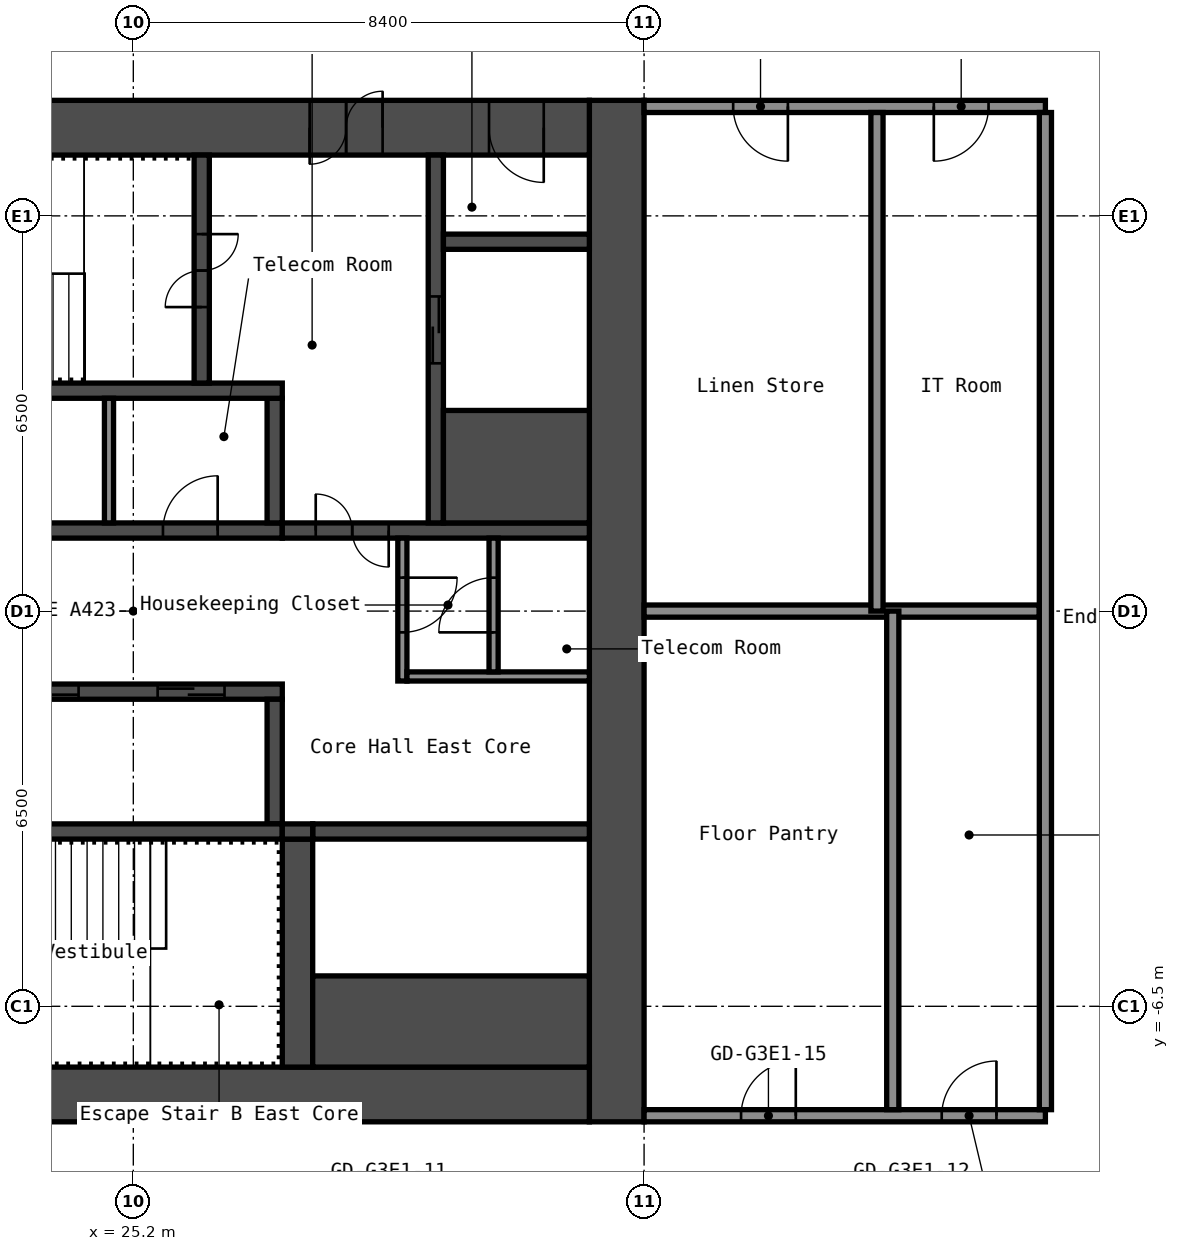
"""IFC4 building model, lengths in metres.
Left out: names, types, materials, properties, quantities, classifications, styles, units other than length and angle.
Written with IfcOpenShell. Run it as: python <this file> out.ifc"""

import sys

from ifc_helpers import new_model, si_unit, direction, frame, frame_2d, origin, place, context, subcontext, project, spatial, rectangle, extrude, element, fill, save


model = new_model("IFC4")
c1 = context("Model", 3, precision=1e-05, world=origin(), true_north=direction((0.0, 1.0)))
c2 = subcontext(c1, "Body", "Model", "MODEL_VIEW")
j1 = project(units=[si_unit("LENGTHUNIT", "METRE"), si_unit("PLANEANGLEUNIT", "RADIAN")], contexts=[c1])
p1 = place(None, origin())
s1 = spatial("IfcSite", under=j1, at=p1, CompositionType="ELEMENT")
p2 = place(p1, origin())
s2 = spatial("IfcBuilding", under=s1, at=p2, CompositionType="ELEMENT")
p3 = place(p2, frame((0.0, 0.0, 159.8)))
s3 = spatial("IfcBuildingStorey", under=s2, at=p3, CompositionType="ELEMENT", Elevation=159.8)
p4 = place(p3, frame((33.15, -8.4, 0.0), z_axis=(0.0, 0.0, 1.0), x_axis=(0.0, 1.0, 0.0)))
e1 = element("IfcWall", 1, at=p4, inside=s3, PredefinedType="SHEAR", context=c2, shape_type="SweptSolid", body=[
    extrude(rectangle(XDim=16.8, YDim=0.9, at=frame_2d((8.4, 0.0))), origin(), (0.0, 0.0, 1.0), 2.75),
])
p5 = place(p3, frame((17.7, 7.95, 0.0), z_axis=(0.0, 0.0, 1.0), x_axis=(1.0, 0.0, 0.0)))
e2 = element("IfcWall", 2, at=p5, inside=s3, PredefinedType="SHEAR", context=c2, shape_type="SweptSolid", body=[
    extrude(rectangle(XDim=15.0, YDim=0.9, at=frame_2d((7.5, 0.0))), origin(), (0.0, 0.0, 1.0), 2.75),
])
p6 = place(p5, frame((10.4, 0.0, 0.0)))
e3 = element("IfcOpeningElement", 3, at=p6, cuts=e2, PredefinedType="OPENING", context=c2, shape_type="SweptSolid", body=[
    extrude(rectangle(XDim=1.2, YDim=2.1, at=frame_2d((0.6, 1.05))), frame((0.0, 0.46, 0.0), z_axis=(0.0, -1.0, 0.0), x_axis=(1.0, 0.0, 0.0)), (0.0, 0.0, 1.0), 0.92),
])
p7 = place(p5, frame((13.35, 0.0, 0.0)))
e4 = element("IfcOpeningElement", 4, at=p7, cuts=e2, PredefinedType="OPENING", context=c2, shape_type="SweptSolid", body=[
    extrude(rectangle(XDim=0.9, YDim=2.1, at=frame_2d((0.45, 1.05))), frame((0.0, 0.46, 0.0), z_axis=(0.0, -1.0, 0.0), x_axis=(1.0, 0.0, 0.0)), (0.0, 0.0, 1.0), 0.92),
])
p8 = place(p3, frame((17.7, -7.95, 0.0), z_axis=(0.0, 0.0, 1.0), x_axis=(1.0, 0.0, 0.0)))
e5 = element("IfcWall", 5, at=p8, inside=s3, PredefinedType="SHEAR", context=c2, shape_type="SweptSolid", body=[
    extrude(rectangle(XDim=15.0, YDim=0.9, at=frame_2d((7.5, 0.0))), origin(), (0.0, 0.0, 1.0), 2.75),
])
p9 = place(p8, frame((2.55, 0.0, 0.0)))
e6 = element("IfcOpeningElement", 6, at=p9, cuts=e5, PredefinedType="OPENING", context=c2, shape_type="SweptSolid", body=[
    extrude(rectangle(XDim=1.0, YDim=2.1, at=frame_2d((0.5, 1.05))), frame((0.0, 0.46, 0.0), z_axis=(0.0, -1.0, 0.0), x_axis=(1.0, 0.0, 0.0)), (0.0, 0.0, 1.0), 0.92),
])
p10 = place(p3, frame((20.15, 1.325, 0.0), z_axis=(0.0, 0.0, 1.0), x_axis=(1.0, 0.0, 0.0)))
e7 = element("IfcWall", 7, at=p10, inside=s3, PredefinedType="SHEAR", context=c2, shape_type="SweptSolid", body=[
    extrude(rectangle(XDim=7.5, YDim=0.25, at=frame_2d((3.75, 0.0))), origin(), (0.0, 0.0, 1.0), 2.75),
])
p11 = place(p10, frame((1.837, 0.0, 0.0)))
e8 = element("IfcOpeningElement", 8, at=p11, cuts=e7, PredefinedType="OPENING", context=c2, shape_type="SweptSolid", body=[
    extrude(rectangle(XDim=0.9, YDim=2.1, at=frame_2d((0.45, 1.05))), frame((0.0, 0.135, 0.0), z_axis=(0.0, -1.0, 0.0), x_axis=(1.0, 0.0, 0.0)), (0.0, 0.0, 1.0), 0.27),
])
p12 = place(p10, frame((5.538, 0.0, 0.0)))
e9 = element("IfcOpeningElement", 9, at=p12, cuts=e7, PredefinedType="OPENING", context=c2, shape_type="SweptSolid", body=[
    extrude(rectangle(XDim=0.9, YDim=2.1, at=frame_2d((0.45, 1.05))), frame((0.0, 0.135, 0.0), z_axis=(0.0, -1.0, 0.0), x_axis=(1.0, 0.0, 0.0)), (0.0, 0.0, 1.0), 0.27),
])
p13 = place(p3, frame((27.525, 1.45, 0.0), z_axis=(0.0, 0.0, 1.0), x_axis=(0.0, 1.0, 0.0)))
e10 = element("IfcWall", 10, at=p13, inside=s3, PredefinedType="SHEAR", context=c2, shape_type="SweptSolid", body=[
    extrude(rectangle(XDim=2.05, YDim=0.25, at=frame_2d((1.025, 0.0))), origin(), (0.0, 0.0, 1.0), 2.75),
])
p14 = place(p3, frame((20.15, 3.625, 0.0), z_axis=(0.0, 0.0, 1.0), x_axis=(1.0, 0.0, 0.0)))
e11 = element("IfcWall", 11, at=p14, inside=s3, PredefinedType="SHEAR", context=c2, shape_type="SweptSolid", body=[
    extrude(rectangle(XDim=7.5, YDim=0.25, at=frame_2d((3.75, 0.0))), origin(), (0.0, 0.0, 1.0), 2.75),
])
p15 = place(p3, frame((26.325, 3.75, 0.0), z_axis=(0.0, 0.0, 1.0), x_axis=(0.0, 1.0, 0.0)))
e12 = element("IfcWall", 12, at=p15, inside=s3, PredefinedType="SHEAR", context=c2, shape_type="SweptSolid", body=[
    extrude(rectangle(XDim=3.75, YDim=0.25, at=frame_2d((1.875, 0.0))), origin(), (0.0, 0.0, 1.0), 2.75),
])
p16 = place(p15, frame((1.25, 0.0, 0.0)))
e13 = element("IfcOpeningElement", 13, at=p16, cuts=e12, PredefinedType="OPENING", context=c2, shape_type="SweptSolid", body=[
    extrude(rectangle(XDim=1.2, YDim=2.1, at=frame_2d((0.6, 1.05))), frame((0.0, 0.135, 0.0), z_axis=(0.0, -1.0, 0.0), x_axis=(1.0, 0.0, 0.0)), (0.0, 0.0, 1.0), 0.27),
])
p17 = place(p3, frame((27.65, 1.325, 0.0), z_axis=(0.0, 0.0, 1.0), x_axis=(1.0, 0.0, 0.0)))
e14 = element("IfcWall", 14, at=p17, inside=s3, PredefinedType="SHEAR", context=c2, shape_type="SweptSolid", body=[
    extrude(rectangle(XDim=5.05, YDim=0.25, at=frame_2d((2.525, 0.0))), origin(), (0.0, 0.0, 1.0), 2.75),
])
p18 = place(p17, frame((0.55, 0.0, 0.0)))
e15 = element("IfcOpeningElement", 15, at=p18, cuts=e14, PredefinedType="OPENING", context=c2, shape_type="SweptSolid", body=[
    extrude(rectangle(XDim=1.2, YDim=2.1, at=frame_2d((0.6, 1.05))), frame((0.0, 0.135, 0.0), z_axis=(0.0, -1.0, 0.0), x_axis=(1.0, 0.0, 0.0)), (0.0, 0.0, 1.0), 0.27),
])
p19 = place(p3, frame((30.175, 1.45, 0.0), z_axis=(0.0, 0.0, 1.0), x_axis=(0.0, 1.0, 0.0)))
e16 = element("IfcWall", 16, at=p19, inside=s3, PredefinedType="SHEAR", context=c2, shape_type="SweptSolid", body=[
    extrude(rectangle(XDim=6.05, YDim=0.25, at=frame_2d((3.025, 0.0))), origin(), (0.0, 0.0, 1.0), 2.75),
])
p20 = place(p19, frame((2.625, 0.0, 0.0)))
e17 = element("IfcOpeningElement", 17, at=p20, cuts=e16, PredefinedType="OPENING", context=c2, shape_type="SweptSolid", body=[
    extrude(rectangle(XDim=1.1, YDim=2.1, at=frame_2d((0.55, 1.05))), frame((0.0, 0.135, 0.0), z_axis=(0.0, -1.0, 0.0), x_axis=(1.0, 0.0, 0.0)), (0.0, 0.0, 1.0), 0.27),
])
p21 = place(p3, frame((30.3, 2.375, 0.0), z_axis=(0.0, 0.0, 1.0), x_axis=(1.0, 0.0, 0.0)))
e18 = element("IfcWall", 18, at=p21, inside=s3, PredefinedType="SHEAR", context=c2, shape_type="SweptSolid", body=[
    extrude(rectangle(XDim=2.4, YDim=1.85, at=frame_2d((1.2, 0.0))), origin(), (0.0, 0.0, 1.0), 2.75),
])
p22 = place(p3, frame((30.3, 6.075, 0.0), z_axis=(0.0, 0.0, 1.0), x_axis=(1.0, 0.0, 0.0)))
e19 = element("IfcWall", 19, at=p22, inside=s3, PredefinedType="SHEAR", context=c2, shape_type="SweptSolid", body=[
    extrude(rectangle(XDim=2.4, YDim=0.25, at=frame_2d((1.2, 0.0))), origin(), (0.0, 0.0, 1.0), 2.75),
])
p23 = place(p3, frame((20.15, -1.325, 0.0), z_axis=(0.0, 0.0, 1.0), x_axis=(1.0, 0.0, 0.0)))
e20 = element("IfcWall", 20, at=p23, inside=s3, PredefinedType="SHEAR", context=c2, shape_type="SweptSolid", body=[
    extrude(rectangle(XDim=7.5, YDim=0.25, at=frame_2d((3.75, 0.0))), origin(), (0.0, 0.0, 1.0), 2.75),
])
p24 = place(p23, frame((0.65, 0.0, 0.0)))
e21 = element("IfcOpeningElement", 21, at=p24, cuts=e20, PredefinedType="OPENING", context=c2, shape_type="SweptSolid", body=[
    extrude(rectangle(XDim=1.1, YDim=2.1, at=frame_2d((0.55, 1.05))), frame((0.0, 0.135, 0.0), z_axis=(0.0, -1.0, 0.0), x_axis=(1.0, 0.0, 0.0)), (0.0, 0.0, 1.0), 0.27),
])
p25 = place(p23, frame((3.05, 0.0, 0.0)))
e22 = element("IfcOpeningElement", 22, at=p25, cuts=e20, PredefinedType="OPENING", context=c2, shape_type="SweptSolid", body=[
    extrude(rectangle(XDim=1.1, YDim=2.1, at=frame_2d((0.55, 1.05))), frame((0.0, 0.135, 0.0), z_axis=(0.0, -1.0, 0.0), x_axis=(1.0, 0.0, 0.0)), (0.0, 0.0, 1.0), 0.27),
])
p26 = place(p23, frame((5.45, 0.0, 0.0)))
e23 = element("IfcOpeningElement", 23, at=p26, cuts=e20, PredefinedType="OPENING", context=c2, shape_type="SweptSolid", body=[
    extrude(rectangle(XDim=1.1, YDim=2.1, at=frame_2d((0.55, 1.05))), frame((0.0, 0.135, 0.0), z_axis=(0.0, -1.0, 0.0), x_axis=(1.0, 0.0, 0.0)), (0.0, 0.0, 1.0), 0.27),
])
p27 = place(p3, frame((27.525, -3.5, 0.0), z_axis=(0.0, 0.0, 1.0), x_axis=(0.0, 1.0, 0.0)))
e24 = element("IfcWall", 24, at=p27, inside=s3, PredefinedType="SHEAR", context=c2, shape_type="SweptSolid", body=[
    extrude(rectangle(XDim=2.05, YDim=0.25, at=frame_2d((1.025, 0.0))), origin(), (0.0, 0.0, 1.0), 2.75),
])
p28 = place(p3, frame((20.15, -3.625, 0.0), z_axis=(0.0, 0.0, 1.0), x_axis=(1.0, 0.0, 0.0)))
e25 = element("IfcWall", 25, at=p28, inside=s3, PredefinedType="SHEAR", context=c2, shape_type="SweptSolid", body=[
    extrude(rectangle(XDim=7.5, YDim=0.25, at=frame_2d((3.75, 0.0))), origin(), (0.0, 0.0, 1.0), 2.75),
])
p29 = place(p3, frame((27.9, -7.5, 0.0), z_axis=(0.0, 0.0, 1.0), x_axis=(0.0, 1.0, 0.0)))
e26 = element("IfcWall", 26, at=p29, inside=s3, PredefinedType="SHEAR", context=c2, shape_type="SweptSolid", body=[
    extrude(rectangle(XDim=3.75, YDim=0.5, at=frame_2d((1.875, 0.0))), origin(), (0.0, 0.0, 1.0), 2.75),
])
p30 = place(p3, frame((28.15, -3.625, 0.0), z_axis=(0.0, 0.0, 1.0), x_axis=(1.0, 0.0, 0.0)))
e27 = element("IfcWall", 27, at=p30, inside=s3, PredefinedType="SHEAR", context=c2, shape_type="SweptSolid", body=[
    extrude(rectangle(XDim=4.55, YDim=0.25, at=frame_2d((2.275, 0.0))), origin(), (0.0, 0.0, 1.0), 2.75),
])
p31 = place(p3, frame((28.15, -6.75, 0.0), z_axis=(0.0, 0.0, 1.0), x_axis=(1.0, 0.0, 0.0)))
e28 = element("IfcWall", 28, at=p31, inside=s3, PredefinedType="SHEAR", context=c2, shape_type="SweptSolid", body=[
    extrude(rectangle(XDim=4.55, YDim=1.5, at=frame_2d((2.275, 0.0))), origin(), (0.0, 0.0, 1.0), 2.75),
])
p32 = place(p3, frame((27.65, -3.625, 0.0), z_axis=(0.0, 0.0, 1.0), x_axis=(1.0, 0.0, 0.0)))
e29 = element("IfcWall", 29, at=p32, inside=s3, PredefinedType="SHEAR", context=c2, shape_type="SweptSolid", body=[
    extrude(rectangle(XDim=0.5, YDim=0.25, at=frame_2d((0.25, 0.0))), origin(), (0.0, 0.0, 1.0), 2.75),
])
p33 = place(p3, frame((29.625, -1.15, 0.0), z_axis=(0.0, 0.0, 1.0), x_axis=(0.0, 1.0, 0.0)))
e30 = element("IfcWall", 30, at=p33, inside=s3, PredefinedType="PARTITIONING", context=c2, shape_type="SweptSolid", body=[
    extrude(rectangle(XDim=2.35, YDim=0.15, at=frame_2d((1.175, 0.0))), origin(), (0.0, 0.0, 1.0), 2.75),
])
p34 = place(p33, frame((0.8, 0.0, 0.0)))
e31 = element("IfcOpeningElement", 31, at=p34, cuts=e30, PredefinedType="OPENING", context=c2, shape_type="SweptSolid", body=[
    extrude(rectangle(XDim=0.9, YDim=2.1, at=frame_2d((0.45, 1.05))), frame((0.0, 0.085, 0.0), z_axis=(0.0, -1.0, 0.0), x_axis=(1.0, 0.0, 0.0)), (0.0, 0.0, 1.0), 0.17),
])
p35 = place(p3, frame((29.7, -1.075, 0.0), z_axis=(0.0, 0.0, 1.0), x_axis=(1.0, 0.0, 0.0)))
e32 = element("IfcWall", 32, at=p35, inside=s3, PredefinedType="PARTITIONING", context=c2, shape_type="SweptSolid", body=[
    extrude(rectangle(XDim=3.0, YDim=0.15, at=frame_2d((1.5, 0.0))), origin(), (0.0, 0.0, 1.0), 2.75),
])
p36 = place(p3, frame((31.125, -1.0, 0.0), z_axis=(0.0, 0.0, 1.0), x_axis=(0.0, 1.0, 0.0)))
e33 = element("IfcWall", 33, at=p36, inside=s3, PredefinedType="PARTITIONING", context=c2, shape_type="SweptSolid", body=[
    extrude(rectangle(XDim=2.2, YDim=0.15, at=frame_2d((1.1, 0.0))), origin(), (0.0, 0.0, 1.0), 2.75),
])
p37 = place(p36, frame((0.65, 0.0, 0.0)))
e34 = element("IfcOpeningElement", 34, at=p37, cuts=e33, PredefinedType="OPENING", context=c2, shape_type="SweptSolid", body=[
    extrude(rectangle(XDim=0.9, YDim=2.1, at=frame_2d((0.45, 1.05))), frame((0.0, 0.085, 0.0), z_axis=(0.0, -1.0, 0.0), x_axis=(1.0, 0.0, 0.0)), (0.0, 0.0, 1.0), 0.17),
])
p38 = place(p3, frame((24.8, 1.45, 0.0), z_axis=(0.0, 0.0, 1.0), x_axis=(0.0, 1.0, 0.0)))
e35 = element("IfcWall", 35, at=p38, inside=s3, PredefinedType="PARTITIONING", context=c2, shape_type="SweptSolid", body=[
    extrude(rectangle(XDim=2.05, YDim=0.15, at=frame_2d((1.025, 0.0))), origin(), (0.0, 0.0, 1.0), 2.75),
])
p39 = place(p3, frame((33.6, -8.3, 0.0), z_axis=(0.0, 0.0, 1.0), x_axis=(1.0, 0.0, 0.0)))
e36 = element("IfcWall", 36, at=p39, inside=s3, PredefinedType="PARTITIONING", context=c2, shape_type="SweptSolid", body=[
    extrude(rectangle(XDim=6.6, YDim=0.2, at=frame_2d((3.3, 0.0))), origin(), (0.0, 0.0, 1.0), 2.75),
])
p40 = place(p39, frame((1.595, 0.0, 0.0)))
e37 = element("IfcOpeningElement", 37, at=p40, cuts=e36, PredefinedType="OPENING", context=c2, shape_type="SweptSolid", body=[
    extrude(rectangle(XDim=0.9, YDim=2.1, at=frame_2d((0.45, 1.05))), frame((0.0, 0.11, 0.0), z_axis=(0.0, -1.0, 0.0), x_axis=(1.0, 0.0, 0.0)), (0.0, 0.0, 1.0), 0.22),
])
p41 = place(p39, frame((4.895, 0.0, 0.0)))
e38 = element("IfcOpeningElement", 38, at=p41, cuts=e36, PredefinedType="OPENING", context=c2, shape_type="SweptSolid", body=[
    extrude(rectangle(XDim=0.9, YDim=2.1, at=frame_2d((0.45, 1.05))), frame((0.0, 0.11, 0.0), z_axis=(0.0, -1.0, 0.0), x_axis=(1.0, 0.0, 0.0)), (0.0, 0.0, 1.0), 0.22),
])
p42 = place(p3, frame((33.6, 0.0, 0.0), z_axis=(0.0, 0.0, 1.0), x_axis=(1.0, 0.0, 0.0)))
e39 = element("IfcWall", 39, at=p42, inside=s3, PredefinedType="PARTITIONING", context=c2, shape_type="SweptSolid", body=[
    extrude(rectangle(XDim=6.5, YDim=0.2, at=frame_2d((3.25, 0.0))), origin(), (0.0, 0.0, 1.0), 2.75),
])
p43 = place(p3, frame((33.6, 8.3, 0.0), z_axis=(0.0, 0.0, 1.0), x_axis=(1.0, 0.0, 0.0)))
e40 = element("IfcWall", 40, at=p43, inside=s3, PredefinedType="PARTITIONING", context=c2, shape_type="SweptSolid", body=[
    extrude(rectangle(XDim=6.6, YDim=0.2, at=frame_2d((3.3, 0.0))), origin(), (0.0, 0.0, 1.0), 2.75),
])
p44 = place(p43, frame((1.465, 0.0, 0.0)))
e41 = element("IfcOpeningElement", 41, at=p44, cuts=e40, PredefinedType="OPENING", context=c2, shape_type="SweptSolid", body=[
    extrude(rectangle(XDim=0.9, YDim=2.1, at=frame_2d((0.45, 1.05))), frame((0.0, 0.11, 0.0), z_axis=(0.0, -1.0, 0.0), x_axis=(1.0, 0.0, 0.0)), (0.0, 0.0, 1.0), 0.22),
])
p45 = place(p43, frame((4.765, 0.0, 0.0)))
e42 = element("IfcOpeningElement", 42, at=p45, cuts=e40, PredefinedType="OPENING", context=c2, shape_type="SweptSolid", body=[
    extrude(rectangle(XDim=0.9, YDim=2.1, at=frame_2d((0.45, 1.05))), frame((0.0, 0.11, 0.0), z_axis=(0.0, -1.0, 0.0), x_axis=(1.0, 0.0, 0.0)), (0.0, 0.0, 1.0), 0.22),
])
for number, where, z_axis, x_axis in (
    (43, (37.43, 0.0, 0.0), (0.0, 0.0, 1.0), (0.0, 1.0, 0.0)),
    (44, (37.69, -8.2, 0.0), (0.0, 0.0, 1.0), (0.0, 1.0, 0.0)),
):
    element("IfcWall", number, at=place(p3, frame(where, z_axis=z_axis, x_axis=x_axis)), inside=s3, PredefinedType="PARTITIONING", context=c2, shape_type="SweptSolid", body=[
        extrude(rectangle(XDim=8.2, YDim=0.2, at=frame_2d((4.1, 0.0))), origin(), (0.0, 0.0, 1.0), 2.75),
    ])
p46 = place(p3, frame((40.2, -8.2, 0.0), z_axis=(0.0, 0.0, 1.0), x_axis=(0.0, 1.0, 0.0)))
e45 = element("IfcWall", 45, at=p46, inside=s3, PredefinedType="PARTITIONING", context=c2, shape_type="SweptSolid", body=[
    extrude(rectangle(XDim=16.4, YDim=0.2, at=frame_2d((8.2, 0.0))), origin(), (0.0, 0.0, 1.0), 2.75),
])
p47 = place(p6, origin())
e46 = element("IfcDoor", 46, at=p47, inside=s3, OperationType="DOUBLE_DOOR_SINGLE_SWING", PredefinedType="DOOR", context=c2, shape_type="SweptSolid", body=[
    extrude(rectangle(XDim=1.2, YDim=2.1, at=frame_2d((0.6, 1.05))), frame((0.0, 0.025, 0.0), z_axis=(0.0, -1.0, 0.0), x_axis=(1.0, 0.0, 0.0)), (0.0, 0.0, 1.0), 0.05),
])
fill(e3, e46)
p48 = place(p7, origin())
e47 = element("IfcDoor", 47, at=p48, inside=s3, OperationType="SINGLE_SWING_RIGHT", PredefinedType="DOOR", context=c2, shape_type="SweptSolid", body=[
    extrude(rectangle(XDim=0.9, YDim=2.1, at=frame_2d((0.45, 1.05))), frame((0.0, 0.025, 0.0), z_axis=(0.0, -1.0, 0.0), x_axis=(1.0, 0.0, 0.0)), (0.0, 0.0, 1.0), 0.05),
])
fill(e4, e47)
p49 = place(p16, origin())
e48 = element("IfcDoor", 48, at=p49, inside=s3, OperationType="DOUBLE_DOOR_SINGLE_SWING", PredefinedType="DOOR", context=c2, shape_type="SweptSolid", body=[
    extrude(rectangle(XDim=1.2, YDim=2.1, at=frame_2d((0.6, 1.05))), frame((0.0, 0.025, 0.0), z_axis=(0.0, -1.0, 0.0), x_axis=(1.0, 0.0, 0.0)), (0.0, 0.0, 1.0), 0.05),
])
fill(e13, e48)
p50 = place(p18, origin())
e49 = element("IfcDoor", 49, at=p50, inside=s3, OperationType="DOUBLE_DOOR_SINGLE_SWING", PredefinedType="DOOR", context=c2, shape_type="SweptSolid", body=[
    extrude(rectangle(XDim=1.2, YDim=2.1, at=frame_2d((0.6, 1.05))), frame((0.0, 0.025, 0.0), z_axis=(0.0, -1.0, 0.0), x_axis=(1.0, 0.0, 0.0)), (0.0, 0.0, 1.0), 0.05),
])
fill(e15, e49)
p51 = place(p34, origin())
e50 = element("IfcDoor", 50, at=p51, inside=s3, OperationType="SINGLE_SWING_RIGHT", PredefinedType="DOOR", context=c2, shape_type="SweptSolid", body=[
    extrude(rectangle(XDim=0.9, YDim=2.1, at=frame_2d((0.45, 1.05))), frame((0.0, 0.025, 0.0), z_axis=(0.0, -1.0, 0.0), x_axis=(1.0, 0.0, 0.0)), (0.0, 0.0, 1.0), 0.05),
])
fill(e31, e50)
p52 = place(p37, origin())
e51 = element("IfcDoor", 51, at=p52, inside=s3, OperationType="SINGLE_SWING_RIGHT", PredefinedType="DOOR", context=c2, shape_type="SweptSolid", body=[
    extrude(rectangle(XDim=0.9, YDim=2.1, at=frame_2d((0.45, 1.05))), frame((0.0, 0.025, 0.0), z_axis=(0.0, -1.0, 0.0), x_axis=(1.0, 0.0, 0.0)), (0.0, 0.0, 1.0), 0.05),
])
fill(e34, e51)
p53 = place(p12, origin())
e52 = element("IfcDoor", 52, at=p53, inside=s3, OperationType="SINGLE_SWING_LEFT", PredefinedType="DOOR", context=c2, shape_type="SweptSolid", body=[
    extrude(rectangle(XDim=0.9, YDim=2.1, at=frame_2d((0.45, 1.05))), frame((0.0, 0.025, 0.0), z_axis=(0.0, -1.0, 0.0), x_axis=(1.0, 0.0, 0.0)), (0.0, 0.0, 1.0), 0.05),
])
fill(e9, e52)
p54 = place(p25, origin())
e53 = element("IfcDoor", 53, at=p54, inside=s3, OperationType="DOUBLE_DOOR_SLIDING", PredefinedType="DOOR", context=c2, shape_type="SweptSolid", body=[
    extrude(rectangle(XDim=1.1, YDim=2.1, at=frame_2d((0.55, 1.05))), frame((0.0, 0.025, 0.0), z_axis=(0.0, -1.0, 0.0), x_axis=(1.0, 0.0, 0.0)), (0.0, 0.0, 1.0), 0.05),
])
fill(e22, e53)
p55 = place(p26, origin())
e54 = element("IfcDoor", 54, at=p55, inside=s3, OperationType="DOUBLE_DOOR_SLIDING", PredefinedType="DOOR", context=c2, shape_type="SweptSolid", body=[
    extrude(rectangle(XDim=1.1, YDim=2.1, at=frame_2d((0.55, 1.05))), frame((0.0, 0.025, 0.0), z_axis=(0.0, -1.0, 0.0), x_axis=(1.0, 0.0, 0.0)), (0.0, 0.0, 1.0), 0.05),
])
fill(e23, e54)
p56 = place(p20, origin())
e55 = element("IfcDoor", 55, at=p56, inside=s3, OperationType="DOUBLE_DOOR_SLIDING", PredefinedType="DOOR", context=c2, shape_type="SweptSolid", body=[
    extrude(rectangle(XDim=1.1, YDim=2.1, at=frame_2d((0.55, 1.05))), frame((0.0, 0.025, 0.0), z_axis=(0.0, -1.0, 0.0), x_axis=(1.0, 0.0, 0.0)), (0.0, 0.0, 1.0), 0.05),
])
fill(e17, e55)
p57 = place(p40, origin())
e56 = element("IfcDoor", 56, at=p57, inside=s3, OperationType="SINGLE_SWING_LEFT", PredefinedType="DOOR", context=c2, shape_type="SweptSolid", body=[
    extrude(rectangle(XDim=0.9, YDim=2.1, at=frame_2d((0.45, 1.05))), frame((0.0, 0.025, 0.0), z_axis=(0.0, -1.0, 0.0), x_axis=(1.0, 0.0, 0.0)), (0.0, 0.0, 1.0), 0.05),
])
fill(e37, e56)
p58 = place(p41, origin())
e57 = element("IfcDoor", 57, at=p58, inside=s3, OperationType="SINGLE_SWING_LEFT", PredefinedType="DOOR", context=c2, shape_type="SweptSolid", body=[
    extrude(rectangle(XDim=0.9, YDim=2.1, at=frame_2d((0.45, 1.05))), frame((0.0, 0.025, 0.0), z_axis=(0.0, -1.0, 0.0), x_axis=(1.0, 0.0, 0.0)), (0.0, 0.0, 1.0), 0.05),
])
fill(e38, e57)
p59 = place(p44, origin())
e58 = element("IfcDoor", 58, at=p59, inside=s3, OperationType="SINGLE_SWING_RIGHT", PredefinedType="DOOR", context=c2, shape_type="SweptSolid", body=[
    extrude(rectangle(XDim=0.9, YDim=2.1, at=frame_2d((0.45, 1.05))), frame((0.0, 0.025, 0.0), z_axis=(0.0, -1.0, 0.0), x_axis=(1.0, 0.0, 0.0)), (0.0, 0.0, 1.0), 0.05),
])
fill(e41, e58)
p60 = place(p45, origin())
e59 = element("IfcDoor", 59, at=p60, inside=s3, OperationType="SINGLE_SWING_LEFT", PredefinedType="DOOR", context=c2, shape_type="SweptSolid", body=[
    extrude(rectangle(XDim=0.9, YDim=2.1, at=frame_2d((0.45, 1.05))), frame((0.0, 0.025, 0.0), z_axis=(0.0, -1.0, 0.0), x_axis=(1.0, 0.0, 0.0)), (0.0, 0.0, 1.0), 0.05),
])
fill(e42, e59)
save(model, sys.argv[1])
